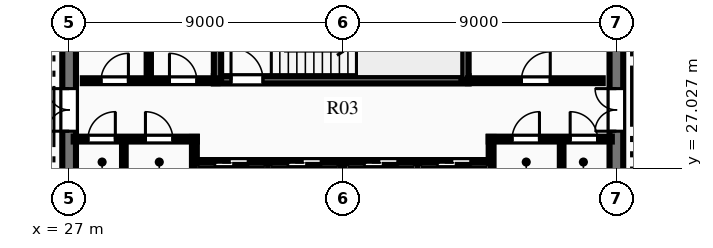
"""IFC4 building model, lengths in metres.
Left out: names, types, materials, properties, quantities, classifications, styles, units other than length and angle.
Written with IfcOpenShell. Run it as: python <this file> out.ifc"""

import sys

from ifc_helpers import new_model, si_unit, direction, frame, frame_2d, origin, place, context, subcontext, project, spatial, rectangle, extrude, element, fill, save


model = new_model("IFC4")
c1 = context("Model", 3, precision=1e-05, world=origin(), true_north=direction((0.0, 1.0)))
c2 = subcontext(c1, "Body", "Model", "MODEL_VIEW")
j1 = project(units=[si_unit("LENGTHUNIT", "METRE"), si_unit("PLANEANGLEUNIT", "RADIAN")], contexts=[c1])
p1 = place(None, origin())
s1 = spatial("IfcSite", under=j1, at=p1, CompositionType="ELEMENT")
p2 = place(p1, origin())
s2 = spatial("IfcBuilding", under=s1, at=p2, CompositionType="ELEMENT")
p3 = place(p2, frame((0.0, 0.0, 317.7)))
s3 = spatial("IfcBuildingStorey", under=s2, at=p3, CompositionType="ELEMENT", Elevation=317.7)
p4 = place(p3, frame((27.0, 18.225, 0.0), z_axis=(0.0, 0.0, 1.0), x_axis=(0.0, 1.0, 0.0)))
e1 = element("IfcWall", 1, at=p4, inside=s3, PredefinedType="SHEAR", context=c2, shape_type="SweptSolid", body=[
    extrude(rectangle(XDim=15.55, YDim=0.45, at=frame_2d((7.775, 0.0))), origin(), (0.0, 0.0, 1.0), 3.75),
])
p5 = place(p4, frame((10.015, 0.0, 0.0)))
e2 = element("IfcOpeningElement", 2, at=p5, cuts=e1, PredefinedType="OPENING", context=c2, shape_type="SweptSolid", body=[
    extrude(rectangle(XDim=1.4, YDim=2.2, at=frame_2d((0.7, 1.1))), frame((0.0, 0.235, 0.0), z_axis=(0.0, -1.0, 0.0), x_axis=(1.0, 0.0, 0.0)), (0.0, 0.0, 1.0), 0.47),
])
p6 = place(p3, frame((45.0, 18.225, 0.0), z_axis=(0.0, 0.0, 1.0), x_axis=(0.0, 1.0, 0.0)))
e3 = element("IfcWall", 3, at=p6, inside=s3, PredefinedType="SHEAR", context=c2, shape_type="SweptSolid", body=[
    extrude(rectangle(XDim=15.55, YDim=0.45, at=frame_2d((7.775, 0.0))), origin(), (0.0, 0.0, 1.0), 3.75),
])
p7 = place(p6, frame((10.015, 0.0, 0.0)))
e4 = element("IfcOpeningElement", 4, at=p7, cuts=e3, PredefinedType="OPENING", context=c2, shape_type="SweptSolid", body=[
    extrude(rectangle(XDim=1.4, YDim=2.2, at=frame_2d((0.7, 1.1))), frame((0.0, 0.235, 0.0), z_axis=(0.0, -1.0, 0.0), x_axis=(1.0, 0.0, 0.0)), (0.0, 0.0, 1.0), 0.47),
])
p8 = place(p3, frame((31.76, 29.93, 0.0), z_axis=(0.0, 0.0, 1.0), x_axis=(1.0, 0.0, 0.0)))
e5 = element("IfcWall", 5, at=p8, inside=s3, PredefinedType="SHEAR", context=c2, shape_type="SweptSolid", body=[
    extrude(rectangle(XDim=8.38, YDim=0.24, at=frame_2d((4.19, 0.0))), origin(), (0.0, 0.0, 1.0), 3.75),
])
p9 = place(p8, frame((0.565, 0.0, 0.0)))
e6 = element("IfcOpeningElement", 6, at=p9, cuts=e5, PredefinedType="OPENING", context=c2, shape_type="SweptSolid", body=[
    extrude(rectangle(XDim=1.05, YDim=2.15, at=frame_2d((0.525, 1.075))), frame((0.0, 0.13, 0.0), z_axis=(0.0, -1.0, 0.0), x_axis=(1.0, 0.0, 0.0)), (0.0, 0.0, 1.0), 0.26),
])
p10 = place(p3, frame((31.88, 29.93, 0.0), z_axis=(0.0, 0.0, 1.0), x_axis=(0.0, 1.0, 0.0)))
e7 = element("IfcWall", 7, at=p10, inside=s3, PredefinedType="SHEAR", context=c2, shape_type="SweptSolid", body=[
    extrude(rectangle(XDim=3.79, YDim=0.24, at=frame_2d((1.895, 0.0))), origin(), (0.0, 0.0, 1.0), 3.75),
])
p11 = place(p3, frame((40.02, 29.93, 0.0), z_axis=(0.0, 0.0, 1.0), x_axis=(0.0, 1.0, 0.0)))
e8 = element("IfcWall", 8, at=p11, inside=s3, PredefinedType="SHEAR", context=c2, shape_type="SweptSolid", body=[
    extrude(rectangle(XDim=3.85, YDim=0.24, at=frame_2d((1.925, 0.0))), origin(), (0.0, 0.0, 1.0), 3.75),
])
p12 = place(p3, frame((27.15, 27.98, 0.0), z_axis=(0.0, 0.0, 1.0), x_axis=(1.0, 0.0, 0.0)))
e9 = element("IfcWall", 9, at=p12, inside=s3, PredefinedType="PARTITIONING", context=c2, shape_type="SweptSolid", body=[
    extrude(rectangle(XDim=4.05, YDim=0.16, at=frame_2d((2.025, 0.0))), origin(), (0.0, 0.0, 1.0), 3.49),
])
p13 = place(p12, frame((0.47, 0.0, 0.0)))
e10 = element("IfcOpeningElement", 10, at=p13, cuts=e9, PredefinedType="OPENING", context=c2, shape_type="SweptSolid", body=[
    extrude(rectangle(XDim=0.9, YDim=2.15, at=frame_2d((0.45, 1.075))), frame((0.0, 0.09, 0.0), z_axis=(0.0, -1.0, 0.0), x_axis=(1.0, 0.0, 0.0)), (0.0, 0.0, 1.0), 0.18),
])
p14 = place(p12, frame((2.36, 0.0, 0.0)))
e11 = element("IfcOpeningElement", 11, at=p14, cuts=e9, PredefinedType="OPENING", context=c2, shape_type="SweptSolid", body=[
    extrude(rectangle(XDim=0.9, YDim=2.15, at=frame_2d((0.45, 1.075))), frame((0.0, 0.09, 0.0), z_axis=(0.0, -1.0, 0.0), x_axis=(1.0, 0.0, 0.0)), (0.0, 0.0, 1.0), 0.18),
])
p15 = place(p3, frame((31.12, 26.54, 0.0), z_axis=(0.0, 0.0, 1.0), x_axis=(0.0, 1.0, 0.0)))
e12 = element("IfcWall", 12, at=p15, inside=s3, PredefinedType="PARTITIONING", context=c2, shape_type="SweptSolid", body=[
    extrude(rectangle(XDim=1.51, YDim=0.16, at=frame_2d((0.755, 0.0))), origin(), (0.0, 0.0, 1.0), 3.49),
])
p16 = place(p3, frame((40.8, 27.98, 0.0), z_axis=(0.0, 0.0, 1.0), x_axis=(1.0, 0.0, 0.0)))
e13 = element("IfcWall", 13, at=p16, inside=s3, PredefinedType="PARTITIONING", context=c2, shape_type="SweptSolid", body=[
    extrude(rectangle(XDim=4.05, YDim=0.16, at=frame_2d((2.025, 0.0))), origin(), (0.0, 0.0, 1.0), 3.49),
])
p17 = place(p16, frame((0.77, 0.0, 0.0)))
e14 = element("IfcOpeningElement", 14, at=p17, cuts=e13, PredefinedType="OPENING", context=c2, shape_type="SweptSolid", body=[
    extrude(rectangle(XDim=0.9, YDim=2.15, at=frame_2d((0.45, 1.075))), frame((0.0, 0.09, 0.0), z_axis=(0.0, -1.0, 0.0), x_axis=(1.0, 0.0, 0.0)), (0.0, 0.0, 1.0), 0.18),
])
p18 = place(p16, frame((2.68, 0.0, 0.0)))
e15 = element("IfcOpeningElement", 15, at=p18, cuts=e13, PredefinedType="OPENING", context=c2, shape_type="SweptSolid", body=[
    extrude(rectangle(XDim=0.9, YDim=2.15, at=frame_2d((0.45, 1.075))), frame((0.0, 0.09, 0.0), z_axis=(0.0, -1.0, 0.0), x_axis=(1.0, 0.0, 0.0)), (0.0, 0.0, 1.0), 0.18),
])
p19 = place(p3, frame((40.88, 26.54, 0.0), z_axis=(0.0, 0.0, 1.0), x_axis=(0.0, 1.0, 0.0)))
e16 = element("IfcWall", 16, at=p19, inside=s3, PredefinedType="PARTITIONING", context=c2, shape_type="SweptSolid", body=[
    extrude(rectangle(XDim=1.51, YDim=0.16, at=frame_2d((0.755, 0.0))), origin(), (0.0, 0.0, 1.0), 3.49),
])
for number, where, z_axis, x_axis in (
    (17, (28.8, 26.54, 0.0), (0.0, 0.0, 1.0), (0.0, 1.0, 0.0)),
    (18, (43.2, 26.54, 0.0), (0.0, 0.0, 1.0), (0.0, 1.0, 0.0)),
):
    element("IfcWall", number, at=place(p3, frame(where, z_axis=z_axis, x_axis=x_axis)), inside=s3, PredefinedType="PARTITIONING", context=c2, shape_type="SweptSolid", body=[
        extrude(rectangle(XDim=1.44, YDim=0.12, at=frame_2d((0.72, 0.0))), origin(), (0.0, 0.0, 1.0), 3.49),
    ])
p20 = place(p3, frame((27.45, 29.9, 0.0), z_axis=(0.0, 0.0, 1.0), x_axis=(1.0, 0.0, 0.0)))
e19 = element("IfcWall", 19, at=p20, inside=s3, PredefinedType="PARTITIONING", context=c2, shape_type="SweptSolid", body=[
    extrude(rectangle(XDim=4.43, YDim=0.16, at=frame_2d((2.215, 0.0))), origin(), (0.0, 0.0, 1.0), 3.49),
])
p21 = place(p20, frame((0.6, 0.0, 0.0)))
e20 = element("IfcOpeningElement", 20, at=p21, cuts=e19, PredefinedType="OPENING", context=c2, shape_type="SweptSolid", body=[
    extrude(rectangle(XDim=0.9, YDim=2.15, at=frame_2d((0.45, 1.075))), frame((0.0, 0.09, 0.0), z_axis=(0.0, -1.0, 0.0), x_axis=(1.0, 0.0, 0.0)), (0.0, 0.0, 1.0), 0.18),
])
p22 = place(p20, frame((2.85, 0.0, 0.0)))
e21 = element("IfcOpeningElement", 21, at=p22, cuts=e19, PredefinedType="OPENING", context=c2, shape_type="SweptSolid", body=[
    extrude(rectangle(XDim=0.9, YDim=2.15, at=frame_2d((0.45, 1.075))), frame((0.0, 0.09, 0.0), z_axis=(0.0, -1.0, 0.0), x_axis=(1.0, 0.0, 0.0)), (0.0, 0.0, 1.0), 0.18),
])
p23 = place(p3, frame((29.62, 29.95, 0.0), z_axis=(0.0, 0.0, 1.0), x_axis=(0.0, 1.0, 0.0)))
e22 = element("IfcWall", 22, at=p23, inside=s3, PredefinedType="PARTITIONING", context=c2, shape_type="SweptSolid", body=[
    extrude(rectangle(XDim=3.6, YDim=0.14, at=frame_2d((1.8, 0.0))), origin(), (0.0, 0.0, 1.0), 3.49),
])
p24 = place(p3, frame((40.12, 29.9, 0.0), z_axis=(0.0, 0.0, 1.0), x_axis=(1.0, 0.0, 0.0)))
e23 = element("IfcWall", 23, at=p24, inside=s3, PredefinedType="PARTITIONING", context=c2, shape_type="SweptSolid", body=[
    extrude(rectangle(XDim=4.43, YDim=0.16, at=frame_2d((2.215, 0.0))), origin(), (0.0, 0.0, 1.0), 3.49),
])
p25 = place(p24, frame((1.755, 0.0, 0.0)))
e24 = element("IfcOpeningElement", 24, at=p25, cuts=e23, PredefinedType="OPENING", context=c2, shape_type="SweptSolid", body=[
    extrude(rectangle(XDim=0.95, YDim=2.15, at=frame_2d((0.475, 1.075))), frame((0.0, 0.09, 0.0), z_axis=(0.0, -1.0, 0.0), x_axis=(1.0, 0.0, 0.0)), (0.0, 0.0, 1.0), 0.18),
])
p26 = place(p3, frame((31.2, 27.2, 0.0), z_axis=(0.0, 0.0, 1.0), x_axis=(1.0, 0.0, 0.0)))
e25 = element("IfcWall", 25, at=p26, inside=s3, PredefinedType="PARTITIONING", context=c2, shape_type="SweptSolid", body=[
    extrude(rectangle(XDim=9.6, YDim=0.18, at=frame_2d((4.8, 0.0))), origin(), (0.0, 0.0, 1.0), 3.49),
])
p27 = place(p26, frame((0.59, 0.0, 0.0)))
e26 = element("IfcOpeningElement", 26, at=p27, cuts=e25, PredefinedType="OPENING", context=c2, shape_type="SweptSolid", body=[
    extrude(rectangle(XDim=1.1, YDim=2.15, at=frame_2d((0.55, 1.075))), frame((0.0, 0.1, 0.0), z_axis=(0.0, -1.0, 0.0), x_axis=(1.0, 0.0, 0.0)), (0.0, 0.0, 1.0), 0.2),
])
p28 = place(p26, frame((2.99, 0.0, 0.0)))
e27 = element("IfcOpeningElement", 27, at=p28, cuts=e25, PredefinedType="OPENING", context=c2, shape_type="SweptSolid", body=[
    extrude(rectangle(XDim=1.1, YDim=2.15, at=frame_2d((0.55, 1.075))), frame((0.0, 0.1, 0.0), z_axis=(0.0, -1.0, 0.0), x_axis=(1.0, 0.0, 0.0)), (0.0, 0.0, 1.0), 0.2),
])
p29 = place(p26, frame((5.51, 0.0, 0.0)))
e28 = element("IfcOpeningElement", 28, at=p29, cuts=e25, PredefinedType="OPENING", context=c2, shape_type="SweptSolid", body=[
    extrude(rectangle(XDim=1.1, YDim=2.15, at=frame_2d((0.55, 1.075))), frame((0.0, 0.1, 0.0), z_axis=(0.0, -1.0, 0.0), x_axis=(1.0, 0.0, 0.0)), (0.0, 0.0, 1.0), 0.2),
])
p30 = place(p26, frame((7.91, 0.0, 0.0)))
e29 = element("IfcOpeningElement", 29, at=p30, cuts=e25, PredefinedType="OPENING", context=c2, shape_type="SweptSolid", body=[
    extrude(rectangle(XDim=1.1, YDim=2.15, at=frame_2d((0.55, 1.075))), frame((0.0, 0.1, 0.0), z_axis=(0.0, -1.0, 0.0), x_axis=(1.0, 0.0, 0.0)), (0.0, 0.0, 1.0), 0.2),
])
for number, where, z_axis, x_axis in (
    (30, (33.54, 25.3, 0.0), (0.0, 0.0, 1.0), (0.0, 1.0, 0.0)),
    (31, (36.0, 25.3, 0.0), (0.0, 0.0, 1.0), (0.0, 1.0, 0.0)),
    (32, (38.46, 25.3, 0.0), (0.0, 0.0, 1.0), (0.0, 1.0, 0.0)),
):
    element("IfcWall", number, at=place(p3, frame(where, z_axis=z_axis, x_axis=x_axis)), inside=s3, PredefinedType="PARTITIONING", context=c2, shape_type="SweptSolid", body=[
        extrude(rectangle(XDim=1.9, YDim=0.18, at=frame_2d((0.95, 0.0))), origin(), (0.0, 0.0, 1.0), 3.49),
    ])
p31 = place(p13, origin())
e33 = element("IfcDoor", 33, at=p31, inside=s3, OperationType="SINGLE_SWING_RIGHT", PredefinedType="DOOR", context=c2, shape_type="SweptSolid", body=[
    extrude(rectangle(XDim=0.9, YDim=2.15, at=frame_2d((0.45, 1.075))), frame((0.0, 0.025, 0.0), z_axis=(0.0, -1.0, 0.0), x_axis=(1.0, 0.0, 0.0)), (0.0, 0.0, 1.0), 0.05),
])
fill(e10, e33)
p32 = place(p14, origin())
e34 = element("IfcDoor", 34, at=p32, inside=s3, OperationType="SINGLE_SWING_LEFT", PredefinedType="DOOR", context=c2, shape_type="SweptSolid", body=[
    extrude(rectangle(XDim=0.9, YDim=2.15, at=frame_2d((0.45, 1.075))), frame((0.0, 0.025, 0.0), z_axis=(0.0, -1.0, 0.0), x_axis=(1.0, 0.0, 0.0)), (0.0, 0.0, 1.0), 0.05),
])
fill(e11, e34)
p33 = place(p17, origin())
e35 = element("IfcDoor", 35, at=p33, inside=s3, OperationType="SINGLE_SWING_RIGHT", PredefinedType="DOOR", context=c2, shape_type="SweptSolid", body=[
    extrude(rectangle(XDim=0.9, YDim=2.15, at=frame_2d((0.45, 1.075))), frame((0.0, 0.025, 0.0), z_axis=(0.0, -1.0, 0.0), x_axis=(1.0, 0.0, 0.0)), (0.0, 0.0, 1.0), 0.05),
])
fill(e14, e35)
p34 = place(p18, origin())
e36 = element("IfcDoor", 36, at=p34, inside=s3, OperationType="SINGLE_SWING_LEFT", PredefinedType="DOOR", context=c2, shape_type="SweptSolid", body=[
    extrude(rectangle(XDim=0.9, YDim=2.15, at=frame_2d((0.45, 1.075))), frame((0.0, 0.025, 0.0), z_axis=(0.0, -1.0, 0.0), x_axis=(1.0, 0.0, 0.0)), (0.0, 0.0, 1.0), 0.05),
])
fill(e15, e36)
p35 = place(p21, origin())
e37 = element("IfcDoor", 37, at=p35, inside=s3, OperationType="SINGLE_SWING_RIGHT", PredefinedType="DOOR", context=c2, shape_type="SweptSolid", body=[
    extrude(rectangle(XDim=0.9, YDim=2.15, at=frame_2d((0.45, 1.075))), frame((0.0, 0.025, 0.0), z_axis=(0.0, -1.0, 0.0), x_axis=(1.0, 0.0, 0.0)), (0.0, 0.0, 1.0), 0.05),
])
fill(e20, e37)
p36 = place(p22, origin())
e38 = element("IfcDoor", 38, at=p36, inside=s3, OperationType="SINGLE_SWING_LEFT", PredefinedType="DOOR", context=c2, shape_type="SweptSolid", body=[
    extrude(rectangle(XDim=0.9, YDim=2.15, at=frame_2d((0.45, 1.075))), frame((0.0, 0.025, 0.0), z_axis=(0.0, -1.0, 0.0), x_axis=(1.0, 0.0, 0.0)), (0.0, 0.0, 1.0), 0.05),
])
fill(e21, e38)
p37 = place(p25, origin())
e39 = element("IfcDoor", 39, at=p37, inside=s3, OperationType="SINGLE_SWING_RIGHT", PredefinedType="DOOR", context=c2, shape_type="SweptSolid", body=[
    extrude(rectangle(XDim=0.95, YDim=2.15, at=frame_2d((0.475, 1.075))), frame((0.0, 0.025, 0.0), z_axis=(0.0, -1.0, 0.0), x_axis=(1.0, 0.0, 0.0)), (0.0, 0.0, 1.0), 0.05),
])
fill(e24, e39)
p38 = place(p9, origin())
e40 = element("IfcDoor", 40, at=p38, inside=s3, OperationType="SINGLE_SWING_LEFT", PredefinedType="DOOR", context=c2, shape_type="SweptSolid", body=[
    extrude(rectangle(XDim=1.05, YDim=2.15, at=frame_2d((0.525, 1.075))), frame((0.0, 0.025, 0.0), z_axis=(0.0, -1.0, 0.0), x_axis=(1.0, 0.0, 0.0)), (0.0, 0.0, 1.0), 0.05),
])
fill(e6, e40)
p39 = place(p5, origin())
e41 = element("IfcDoor", 41, at=p39, inside=s3, OperationType="DOUBLE_DOOR_SINGLE_SWING", PredefinedType="DOOR", context=c2, shape_type="SweptSolid", body=[
    extrude(rectangle(XDim=1.4, YDim=2.2, at=frame_2d((0.7, 1.1))), frame((0.0, 0.025, 0.0), z_axis=(0.0, -1.0, 0.0), x_axis=(1.0, 0.0, 0.0)), (0.0, 0.0, 1.0), 0.05),
])
fill(e2, e41)
p40 = place(p7, origin())
e42 = element("IfcDoor", 42, at=p40, inside=s3, OperationType="DOUBLE_DOOR_SINGLE_SWING", PredefinedType="DOOR", context=c2, shape_type="SweptSolid", body=[
    extrude(rectangle(XDim=1.4, YDim=2.2, at=frame_2d((0.7, 1.1))), frame((0.0, 0.025, 0.0), z_axis=(0.0, -1.0, 0.0), x_axis=(1.0, 0.0, 0.0)), (0.0, 0.0, 1.0), 0.05),
])
fill(e4, e42)
p41 = place(p27, origin())
e43 = element("IfcDoor", 43, at=p41, inside=s3, OperationType="SLIDING_TO_LEFT", PredefinedType="DOOR", context=c2, shape_type="SweptSolid", body=[
    extrude(rectangle(XDim=1.1, YDim=2.15, at=frame_2d((0.55, 1.075))), frame((0.0, 0.025, 0.0), z_axis=(0.0, -1.0, 0.0), x_axis=(1.0, 0.0, 0.0)), (0.0, 0.0, 1.0), 0.05),
])
fill(e26, e43)
p42 = place(p28, origin())
e44 = element("IfcDoor", 44, at=p42, inside=s3, OperationType="SLIDING_TO_LEFT", PredefinedType="DOOR", context=c2, shape_type="SweptSolid", body=[
    extrude(rectangle(XDim=1.1, YDim=2.15, at=frame_2d((0.55, 1.075))), frame((0.0, 0.025, 0.0), z_axis=(0.0, -1.0, 0.0), x_axis=(1.0, 0.0, 0.0)), (0.0, 0.0, 1.0), 0.05),
])
fill(e27, e44)
p43 = place(p29, origin())
e45 = element("IfcDoor", 45, at=p43, inside=s3, OperationType="SLIDING_TO_LEFT", PredefinedType="DOOR", context=c2, shape_type="SweptSolid", body=[
    extrude(rectangle(XDim=1.1, YDim=2.15, at=frame_2d((0.55, 1.075))), frame((0.0, 0.025, 0.0), z_axis=(0.0, -1.0, 0.0), x_axis=(1.0, 0.0, 0.0)), (0.0, 0.0, 1.0), 0.05),
])
fill(e28, e45)
p44 = place(p30, origin())
e46 = element("IfcDoor", 46, at=p44, inside=s3, OperationType="SLIDING_TO_LEFT", PredefinedType="DOOR", context=c2, shape_type="SweptSolid", body=[
    extrude(rectangle(XDim=1.1, YDim=2.15, at=frame_2d((0.55, 1.075))), frame((0.0, 0.025, 0.0), z_axis=(0.0, -1.0, 0.0), x_axis=(1.0, 0.0, 0.0)), (0.0, 0.0, 1.0), 0.05),
])
fill(e29, e46)
save(model, sys.argv[1])
